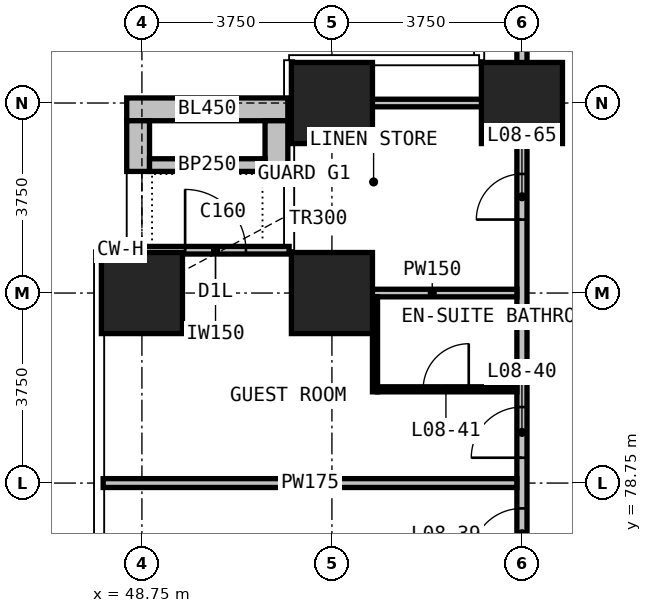
"""IFC4 building model, lengths in metres.
Left out: names, types, materials, properties, quantities, classifications, styles, units other than length and angle.
Written with IfcOpenShell. Run it as: python <this file> out.ifc"""

import sys

from ifc_helpers import new_model, si_unit, direction, frame, frame_2d, origin, origin_2d, place, context, subcontext, project, spatial, rectangle, extrude, element, fill, save


model = new_model("IFC4")
c1 = context("Model", 3, precision=1e-05, world=origin(), true_north=direction((0.0, 1.0)))
c2 = subcontext(c1, "Body", "Model", "MODEL_VIEW")
j1 = project(units=[si_unit("LENGTHUNIT", "METRE"), si_unit("PLANEANGLEUNIT", "RADIAN")], contexts=[c1])
p1 = place(None, origin())
s1 = spatial("IfcSite", under=j1, at=p1, CompositionType="ELEMENT")
p2 = place(p1, origin())
s2 = spatial("IfcBuilding", under=s1, at=p2, CompositionType="ELEMENT")
p3 = place(p2, frame((0.0, 0.0, 46.1)))
s3 = spatial("IfcBuildingStorey", under=s2, at=p3, CompositionType="ELEMENT", Elevation=46.1)
for number, where, z_axis, x_axis in (
    (1, (48.75, 82.5, 0.0), (0.0, 0.0, 1.0), (1.0, 0.0, 0.0)),
    (2, (52.5, 82.5, 0.0), (0.0, 0.0, 1.0), (1.0, 0.0, 0.0)),
    (3, (52.5, 86.25, 0.0), (0.0, 0.0, 1.0), (1.0, 0.0, 0.0)),
    (4, (56.25, 86.25, 0.0), (0.0, 0.0, 1.0), (1.0, 0.0, 0.0)),
):
    element("IfcColumn", number, at=place(p3, frame(where, z_axis=z_axis, x_axis=x_axis)), inside=s3, PredefinedType="COLUMN", context=c2, shape_type="SweptSolid", body=[
        extrude(rectangle(XDim=1.6, YDim=1.6, at=origin_2d()), origin(), (0.0, 0.0, 1.0), 3.3),
    ])
p4 = place(p3, frame((48.75, 83.345, 0.0), z_axis=(0.0, 0.0, 1.0), x_axis=(1.0, 0.0, 0.0)))
e5 = element("IfcWall", 5, at=p4, inside=s3, PredefinedType="SOLIDWALL", context=c2, shape_type="SweptSolid", body=[
    extrude(rectangle(XDim=2.905, YDim=0.15, at=frame_2d((1.453, 0.0))), origin(), (0.0, 0.0, 1.0), 3.0),
])
p5 = place(p4, frame((0.853, 0.0, 0.0)))
e6 = element("IfcOpeningElement", 6, at=p5, cuts=e5, PredefinedType="OPENING", context=c2, shape_type="SweptSolid", body=[
    extrude(rectangle(XDim=1.2, YDim=2.0, at=frame_2d((0.6, 1.0))), frame((0.0, 0.085, 0.0), z_axis=(0.0, -1.0, 0.0), x_axis=(1.0, 0.0, 0.0)), (0.0, 0.0, 1.0), 0.17),
])
p6 = place(p3, frame((48.45, 86.125, 0.0), z_axis=(0.0, 0.0, 1.0), x_axis=(1.0, 0.0, 0.0)))
e7 = element("IfcWall", 7, at=p6, inside=s3, PredefinedType="USERDEFINED", context=c2, shape_type="SweptSolid", body=[
    extrude(rectangle(XDim=3.18, YDim=0.45, at=frame_2d((1.59, 0.0))), origin(), (0.0, 0.0, 1.0), 1.1),
])
for number, where, z_axis, x_axis in (
    (8, (48.675, 84.9, 0.0), (0.0, 0.0, 1.0), (0.0, 1.0, 0.0)),
    (9, (51.405, 84.9, 0.0), (0.0, 0.0, 1.0), (0.0, 1.0, 0.0)),
):
    element("IfcWall", number, at=place(p3, frame(where, z_axis=z_axis, x_axis=x_axis)), inside=s3, PredefinedType="USERDEFINED", context=c2, shape_type="SweptSolid", body=[
        extrude(rectangle(XDim=1.0, YDim=0.45, at=frame_2d((0.5, 0.0))), origin(), (0.0, 0.0, 1.0), 1.1),
    ])
p7 = place(p3, frame((48.9, 85.025, 0.0), z_axis=(0.0, 0.0, 1.0), x_axis=(1.0, 0.0, 0.0)))
e10 = element("IfcWall", 10, at=p7, inside=s3, PredefinedType="USERDEFINED", context=c2, shape_type="SweptSolid", body=[
    extrude(rectangle(XDim=2.28, YDim=0.25, at=frame_2d((1.14, 0.0))), origin(), (0.0, 0.0, 1.0), 1.0),
])
p8 = place(p3, frame((56.25, 52.4, 0.0), z_axis=(0.0, 0.0, 1.0), x_axis=(0.0, 1.0, 0.0)))
e11 = element("IfcWall", 11, at=p8, inside=s3, PredefinedType="PARTITIONING", context=c2, shape_type="SweptSolid", body=[
    extrude(rectangle(XDim=33.925, YDim=0.2, at=frame_2d((16.962, 0.0))), origin(), (0.0, 0.0, 1.0), 3.0),
])
p9 = place(p8, frame((2.35, 0.0, 0.0)))
e12 = element("IfcOpeningElement", 12, at=p9, cuts=e11, PredefinedType="OPENING", context=c2, shape_type="SweptSolid", body=[
    extrude(rectangle(XDim=1.0, YDim=2.2, at=frame_2d((0.5, 1.1))), frame((0.0, 0.11, 0.0), z_axis=(0.0, -1.0, 0.0), x_axis=(1.0, 0.0, 0.0)), (0.0, 0.0, 1.0), 0.22),
])
p10 = place(p8, frame((4.35, 0.0, 0.0)))
e13 = element("IfcOpeningElement", 13, at=p10, cuts=e11, PredefinedType="OPENING", context=c2, shape_type="SweptSolid", body=[
    extrude(rectangle(XDim=1.0, YDim=2.2, at=frame_2d((0.5, 1.1))), frame((0.0, 0.11, 0.0), z_axis=(0.0, -1.0, 0.0), x_axis=(1.0, 0.0, 0.0)), (0.0, 0.0, 1.0), 0.22),
])
p11 = place(p8, frame((9.85, 0.0, 0.0)))
e14 = element("IfcOpeningElement", 14, at=p11, cuts=e11, PredefinedType="OPENING", context=c2, shape_type="SweptSolid", body=[
    extrude(rectangle(XDim=1.0, YDim=2.2, at=frame_2d((0.5, 1.1))), frame((0.0, 0.11, 0.0), z_axis=(0.0, -1.0, 0.0), x_axis=(1.0, 0.0, 0.0)), (0.0, 0.0, 1.0), 0.22),
])
p12 = place(p8, frame((11.85, 0.0, 0.0)))
e15 = element("IfcOpeningElement", 15, at=p12, cuts=e11, PredefinedType="OPENING", context=c2, shape_type="SweptSolid", body=[
    extrude(rectangle(XDim=1.0, YDim=2.2, at=frame_2d((0.5, 1.1))), frame((0.0, 0.11, 0.0), z_axis=(0.0, -1.0, 0.0), x_axis=(1.0, 0.0, 0.0)), (0.0, 0.0, 1.0), 0.22),
])
p13 = place(p8, frame((17.35, 0.0, 0.0)))
e16 = element("IfcOpeningElement", 16, at=p13, cuts=e11, PredefinedType="OPENING", context=c2, shape_type="SweptSolid", body=[
    extrude(rectangle(XDim=1.0, YDim=2.2, at=frame_2d((0.5, 1.1))), frame((0.0, 0.11, 0.0), z_axis=(0.0, -1.0, 0.0), x_axis=(1.0, 0.0, 0.0)), (0.0, 0.0, 1.0), 0.22),
])
p14 = place(p8, frame((19.35, 0.0, 0.0)))
e17 = element("IfcOpeningElement", 17, at=p14, cuts=e11, PredefinedType="OPENING", context=c2, shape_type="SweptSolid", body=[
    extrude(rectangle(XDim=1.0, YDim=2.2, at=frame_2d((0.5, 1.1))), frame((0.0, 0.11, 0.0), z_axis=(0.0, -1.0, 0.0), x_axis=(1.0, 0.0, 0.0)), (0.0, 0.0, 1.0), 0.22),
])
p15 = place(p8, frame((24.85, 0.0, 0.0)))
e18 = element("IfcOpeningElement", 18, at=p15, cuts=e11, PredefinedType="OPENING", context=c2, shape_type="SweptSolid", body=[
    extrude(rectangle(XDim=1.0, YDim=2.2, at=frame_2d((0.5, 1.1))), frame((0.0, 0.11, 0.0), z_axis=(0.0, -1.0, 0.0), x_axis=(1.0, 0.0, 0.0)), (0.0, 0.0, 1.0), 0.22),
])
p16 = place(p8, frame((26.85, 0.0, 0.0)))
e19 = element("IfcOpeningElement", 19, at=p16, cuts=e11, PredefinedType="OPENING", context=c2, shape_type="SweptSolid", body=[
    extrude(rectangle(XDim=1.0, YDim=2.2, at=frame_2d((0.5, 1.1))), frame((0.0, 0.11, 0.0), z_axis=(0.0, -1.0, 0.0), x_axis=(1.0, 0.0, 0.0)), (0.0, 0.0, 1.0), 0.22),
])
p17 = place(p8, frame((31.55, 0.0, 0.0)))
e20 = element("IfcOpeningElement", 20, at=p17, cuts=e11, PredefinedType="OPENING", context=c2, shape_type="SweptSolid", body=[
    extrude(rectangle(XDim=0.9, YDim=2.2, at=frame_2d((0.45, 1.1))), frame((0.0, 0.11, 0.0), z_axis=(0.0, -1.0, 0.0), x_axis=(1.0, 0.0, 0.0)), (0.0, 0.0, 1.0), 0.22),
])
p18 = place(p3, frame((56.25, 86.28, 0.0), z_axis=(0.0, 0.0, 1.0), x_axis=(0.0, 1.0, 0.0)))
e21 = element("IfcWall", 21, at=p18, inside=s3, PredefinedType="PARTITIONING", context=c2, shape_type="SweptSolid", body=[
    extrude(rectangle(XDim=4.365, YDim=0.2, at=frame_2d((2.183, 0.0))), origin(), (0.0, 0.0, 1.0), 3.0),
])
p19 = place(p3, frame((47.985, 78.75, 0.0), z_axis=(0.0, 0.0, 1.0), x_axis=(1.0, 0.0, 0.0)))
e22 = element("IfcWall", 22, at=p19, inside=s3, PredefinedType="PARTITIONING", context=c2, shape_type="SweptSolid", body=[
    extrude(rectangle(XDim=8.165, YDim=0.175, at=frame_2d((4.083, 0.0))), origin(), (0.0, 0.0, 1.0), 3.0),
])
p20 = place(p3, frame((52.81, 82.5, 0.0), z_axis=(0.0, 0.0, 1.0), x_axis=(1.0, 0.0, 0.0)))
e23 = element("IfcWall", 23, at=p20, inside=s3, PredefinedType="PARTITIONING", context=c2, shape_type="SweptSolid", body=[
    extrude(rectangle(XDim=3.34, YDim=0.15, at=frame_2d((1.67, 0.0))), origin(), (0.0, 0.0, 1.0), 3.0),
])
p21 = place(p3, frame((51.855, 86.25, 0.0), z_axis=(0.0, 0.0, 1.0), x_axis=(1.0, 0.0, 0.0)))
e24 = element("IfcWall", 24, at=p21, inside=s3, PredefinedType="PARTITIONING", context=c2, shape_type="SweptSolid", body=[
    extrude(rectangle(XDim=4.295, YDim=0.15, at=frame_2d((2.147, 0.0))), origin(), (0.0, 0.0, 1.0), 3.0),
])
p22 = place(p3, frame((52.735, 82.425, 0.0), z_axis=(0.0, 0.0, 1.0), x_axis=(0.0, 1.0, 0.0)))
e25 = element("IfcWall", 25, at=p22, inside=s3, PredefinedType="PARTITIONING", context=c2, shape_type="SweptSolid", body=[
    extrude(rectangle(XDim=0.84, YDim=0.15, at=frame_2d((0.42, 0.0))), origin(), (0.0, 0.0, 1.0), 3.0),
])
p23 = place(p3, frame((53.4, 80.6, 0.0), z_axis=(0.0, 0.0, 1.0), x_axis=(1.0, 0.0, 0.0)))
e26 = element("IfcWall", 26, at=p23, inside=s3, PredefinedType="PARTITIONING", context=c2, shape_type="SweptSolid", body=[
    extrude(rectangle(XDim=2.75, YDim=0.1, at=frame_2d((1.375, 0.0))), origin(), (0.0, 0.0, 1.0), 3.0),
])
p24 = place(p23, frame((0.9, 0.0, 0.0)))
e27 = element("IfcOpeningElement", 27, at=p24, cuts=e26, PredefinedType="OPENING", context=c2, shape_type="SweptSolid", body=[
    extrude(rectangle(XDim=0.9, YDim=2.2, at=frame_2d((0.45, 1.1))), frame((0.0, 0.06, 0.0), z_axis=(0.0, -1.0, 0.0), x_axis=(1.0, 0.0, 0.0)), (0.0, 0.0, 1.0), 0.12),
])
p25 = place(p3, frame((53.35, 80.55, 0.0), z_axis=(0.0, 0.0, 1.0), x_axis=(0.0, 1.0, 0.0)))
e28 = element("IfcWall", 28, at=p25, inside=s3, PredefinedType="PARTITIONING", context=c2, shape_type="SweptSolid", body=[
    extrude(rectangle(XDim=1.875, YDim=0.1, at=frame_2d((0.938, 0.0))), origin(), (0.0, 0.0, 1.0), 3.0),
])
p26 = place(p5, origin())
e29 = element("IfcDoor", 29, at=p26, inside=s3, OperationType="SINGLE_SWING_LEFT", PredefinedType="DOOR", context=c2, shape_type="SweptSolid", body=[
    extrude(rectangle(XDim=1.2, YDim=2.0, at=frame_2d((0.6, 1.0))), frame((0.0, 0.025, 0.0), z_axis=(0.0, -1.0, 0.0), x_axis=(1.0, 0.0, 0.0)), (0.0, 0.0, 1.0), 0.05),
])
fill(e6, e29)
p27 = place(p15, origin())
e30 = element("IfcDoor", 30, at=p27, inside=s3, OperationType="SINGLE_SWING_LEFT", PredefinedType="DOOR", context=c2, shape_type="SweptSolid", body=[
    extrude(rectangle(XDim=1.0, YDim=2.2, at=frame_2d((0.5, 1.1))), frame((0.0, 0.025, 0.0), z_axis=(0.0, -1.0, 0.0), x_axis=(1.0, 0.0, 0.0)), (0.0, 0.0, 1.0), 0.05),
])
fill(e18, e30)
p28 = place(p16, origin())
e31 = element("IfcDoor", 31, at=p28, inside=s3, OperationType="SINGLE_SWING_LEFT", PredefinedType="DOOR", context=c2, shape_type="SweptSolid", body=[
    extrude(rectangle(XDim=1.0, YDim=2.2, at=frame_2d((0.5, 1.1))), frame((0.0, 0.025, 0.0), z_axis=(0.0, -1.0, 0.0), x_axis=(1.0, 0.0, 0.0)), (0.0, 0.0, 1.0), 0.05),
])
fill(e19, e31)
p29 = place(p24, origin())
e32 = element("IfcDoor", 32, at=p29, inside=s3, OperationType="SINGLE_SWING_RIGHT", PredefinedType="DOOR", context=c2, shape_type="SweptSolid", body=[
    extrude(rectangle(XDim=0.9, YDim=2.2, at=frame_2d((0.45, 1.1))), frame((0.0, 0.025, 0.0), z_axis=(0.0, -1.0, 0.0), x_axis=(1.0, 0.0, 0.0)), (0.0, 0.0, 1.0), 0.05),
])
fill(e27, e32)
p30 = place(p17, origin())
e33 = element("IfcDoor", 33, at=p30, inside=s3, OperationType="SINGLE_SWING_LEFT", PredefinedType="DOOR", context=c2, shape_type="SweptSolid", body=[
    extrude(rectangle(XDim=0.9, YDim=2.2, at=frame_2d((0.45, 1.1))), frame((0.0, 0.025, 0.0), z_axis=(0.0, -1.0, 0.0), x_axis=(1.0, 0.0, 0.0)), (0.0, 0.0, 1.0), 0.05),
])
fill(e20, e33)
save(model, sys.argv[1])
